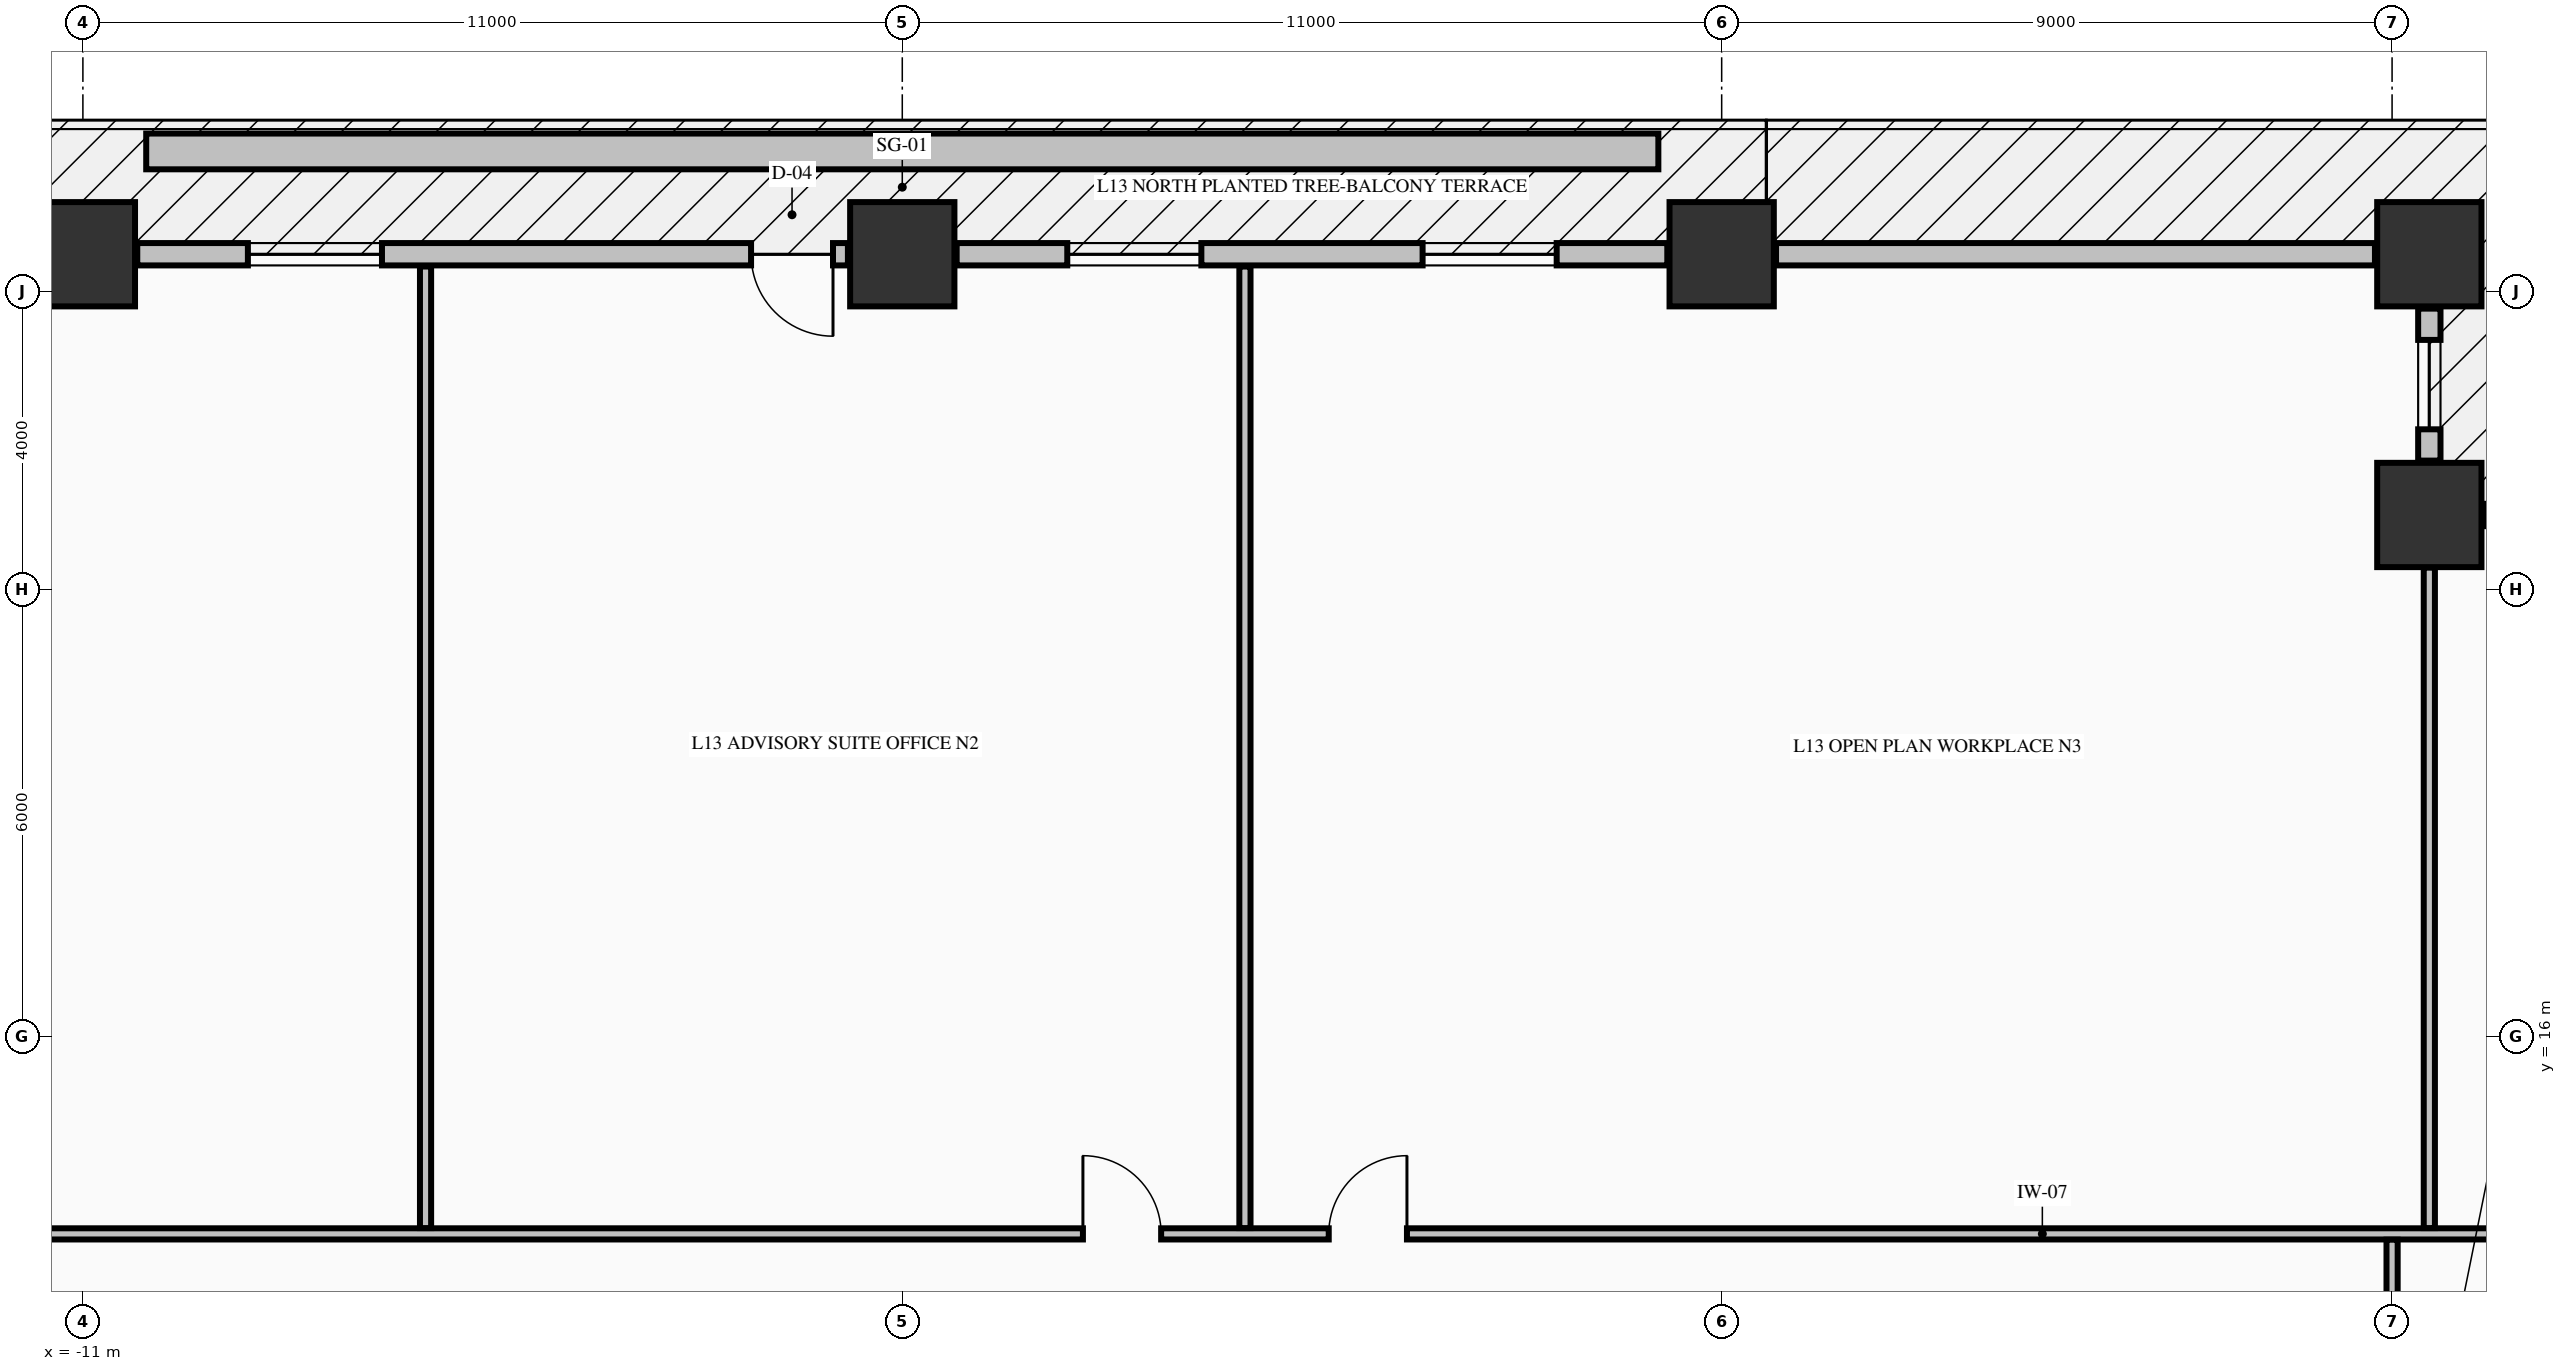
"""IFC4 building model, lengths in metres.
Left out: names, types, materials, properties, quantities, classifications, styles, units other than length and angle.
Written with IfcOpenShell. Run it as: python <this file> out.ifc"""

import sys

from ifc_helpers import new_model, si_unit, direction, frame, frame_2d, origin, origin_2d, place, context, subcontext, project, spatial, rectangle, extrude, element, fill, save


model = new_model("IFC4")
c1 = context("Model", 3, precision=1e-05, world=origin(), true_north=direction((0.0, 1.0)))
c2 = subcontext(c1, "Body", "Model", "MODEL_VIEW")
j1 = project(units=[si_unit("LENGTHUNIT", "METRE"), si_unit("PLANEANGLEUNIT", "RADIAN")], contexts=[c1])
p1 = place(None, origin())
s1 = spatial("IfcSite", under=j1, at=p1, CompositionType="ELEMENT")
p2 = place(p1, origin())
s2 = spatial("IfcBuilding", under=s1, at=p2, CompositionType="ELEMENT")
p3 = place(p2, frame((0.0, 0.0, 57.19)))
s3 = spatial("IfcBuildingStorey", under=s2, at=p3, CompositionType="ELEMENT", Elevation=57.19)
for number, where, z_axis, x_axis in (
    (1, (-11.0, 26.5, -0.425), (0.0, 0.0, 1.0), (1.0, 0.0, 0.0)),
    (2, (0.0, 26.5, -0.425), (0.0, 0.0, 1.0), (1.0, 0.0, 0.0)),
    (3, (11.0, 26.5, -0.425), (0.0, 0.0, 1.0), (1.0, 0.0, 0.0)),
    (4, (20.5, 26.5, -0.425), (0.0, 0.0, 1.0), (1.0, 0.0, 0.0)),
    (5, (20.5, 23.0, -0.425), (0.0, 0.0, 1.0), (1.0, 0.0, 0.0)),
):
    element("IfcColumn", number, at=place(p3, frame(where, z_axis=z_axis, x_axis=x_axis)), inside=s3, PredefinedType="COLUMN", context=c2, shape_type="SweptSolid", body=[
        extrude(rectangle(XDim=1.4, YDim=1.4, at=origin_2d()), origin(), (0.0, 0.0, 1.0), 3.695),
    ])
p4 = place(p3, frame((23.27, 23.0, 0.0), z_axis=(0.0, 0.0, 1.0), x_axis=(-1.0, 0.0, 0.0)))
e6 = element("IfcWall", 6, at=p4, inside=s3, PredefinedType="STANDARD", context=c2, shape_type="SweptSolid", body=[
    extrude(rectangle(XDim=2.04, YDim=0.3, at=frame_2d((1.02, 0.0))), origin(), (0.0, 0.0, 1.0), 2.662),
])
p5 = place(p4, frame((0.42, 0.0, 0.82)))
e7 = element("IfcOpeningElement", 7, at=p5, cuts=e6, PredefinedType="OPENING", context=c2, shape_type="SweptSolid", body=[
    extrude(rectangle(XDim=1.2, YDim=1.65, at=frame_2d((0.6, 0.825))), frame((0.0, 0.16, 0.0), z_axis=(0.0, -1.0, 0.0), x_axis=(1.0, 0.0, 0.0)), (0.0, 0.0, 1.0), 0.32),
])
p6 = place(p3, frame((20.5, 23.73, 0.0), z_axis=(0.0, 0.0, 1.0), x_axis=(0.0, 1.0, 0.0)))
e8 = element("IfcWall", 8, at=p6, inside=s3, PredefinedType="STANDARD", context=c2, shape_type="SweptSolid", body=[
    extrude(rectangle(XDim=2.04, YDim=0.3, at=frame_2d((1.02, 0.0))), origin(), (0.0, 0.0, 1.0), 2.662),
])
p7 = place(p6, frame((0.42, 0.0, 0.82)))
e9 = element("IfcOpeningElement", 9, at=p7, cuts=e8, PredefinedType="OPENING", context=c2, shape_type="SweptSolid", body=[
    extrude(rectangle(XDim=1.2, YDim=1.65, at=frame_2d((0.6, 0.825))), frame((0.0, 0.16, 0.0), z_axis=(0.0, -1.0, 0.0), x_axis=(1.0, 0.0, 0.0)), (0.0, 0.0, 1.0), 0.32),
])
p8 = place(p3, frame((-0.73, 26.5, 0.0), z_axis=(0.0, 0.0, 1.0), x_axis=(-1.0, 0.0, 0.0)))
e10 = element("IfcWall", 10, at=p8, inside=s3, PredefinedType="STANDARD", context=c2, shape_type="SweptSolid", body=[
    extrude(rectangle(XDim=9.54, YDim=0.3, at=frame_2d((4.77, 0.0))), origin(), (0.0, 0.0, 1.0), 2.662),
])
p9 = place(p8, frame((0.2, 0.0, 0.0)))
e11 = element("IfcOpeningElement", 11, at=p9, cuts=e10, PredefinedType="OPENING", context=c2, shape_type="SweptSolid", body=[
    extrude(rectangle(XDim=1.1, YDim=2.15, at=frame_2d((0.55, 1.075))), frame((0.0, 0.16, 0.0), z_axis=(0.0, -1.0, 0.0), x_axis=(1.0, 0.0, 0.0)), (0.0, 0.0, 1.0), 0.32),
])
p10 = place(p8, frame((6.255, 0.0, 0.78)))
e12 = element("IfcOpeningElement", 12, at=p10, cuts=e10, PredefinedType="OPENING", context=c2, shape_type="SweptSolid", body=[
    extrude(rectangle(XDim=1.8, YDim=1.72, at=frame_2d((0.9, 0.86))), frame((0.0, 0.16, 0.0), z_axis=(0.0, -1.0, 0.0), x_axis=(1.0, 0.0, 0.0)), (0.0, 0.0, 1.0), 0.32),
])
p11 = place(p3, frame((10.27, 26.5, 0.0), z_axis=(0.0, 0.0, 1.0), x_axis=(-1.0, 0.0, 0.0)))
e13 = element("IfcWall", 13, at=p11, inside=s3, PredefinedType="STANDARD", context=c2, shape_type="SweptSolid", body=[
    extrude(rectangle(XDim=9.54, YDim=0.3, at=frame_2d((4.77, 0.0))), origin(), (0.0, 0.0, 1.0), 2.662),
])
p12 = place(p11, frame((1.485, 0.0, 0.78)))
e14 = element("IfcOpeningElement", 14, at=p12, cuts=e13, PredefinedType="OPENING", context=c2, shape_type="SweptSolid", body=[
    extrude(rectangle(XDim=1.8, YDim=1.72, at=frame_2d((0.9, 0.86))), frame((0.0, 0.16, 0.0), z_axis=(0.0, -1.0, 0.0), x_axis=(1.0, 0.0, 0.0)), (0.0, 0.0, 1.0), 0.32),
])
p13 = place(p11, frame((6.255, 0.0, 0.78)))
e15 = element("IfcOpeningElement", 15, at=p13, cuts=e13, PredefinedType="OPENING", context=c2, shape_type="SweptSolid", body=[
    extrude(rectangle(XDim=1.8, YDim=1.72, at=frame_2d((0.9, 0.86))), frame((0.0, 0.16, 0.0), z_axis=(0.0, -1.0, 0.0), x_axis=(1.0, 0.0, 0.0)), (0.0, 0.0, 1.0), 0.32),
])
p14 = place(p3, frame((19.77, 26.5, 0.0), z_axis=(0.0, 0.0, 1.0), x_axis=(-1.0, 0.0, 0.0)))
e16 = element("IfcWall", 16, at=p14, inside=s3, PredefinedType="STANDARD", context=c2, shape_type="SweptSolid", body=[
    extrude(rectangle(XDim=8.04, YDim=0.3, at=frame_2d((4.02, 0.0))), origin(), (0.0, 0.0, 1.0), 2.662),
])
p15 = place(p3, frame((-28.835, 13.35, 0.0), z_axis=(0.0, 0.0, 1.0), x_axis=(1.0, 0.0, 0.0)))
e17 = element("IfcWall", 17, at=p15, inside=s3, PredefinedType="PARTITIONING", context=c2, shape_type="SweptSolid", body=[
    extrude(rectangle(XDim=52.67, YDim=0.15, at=frame_2d((26.335, 0.0))), origin(), (0.0, 0.0, 1.0), 3.27),
])
p16 = place(p15, frame((15.21, 0.0, 0.0)))
e18 = element("IfcOpeningElement", 18, at=p16, cuts=e17, PredefinedType="OPENING", context=c2, shape_type="SweptSolid", body=[
    extrude(rectangle(XDim=1.05, YDim=2.15, at=frame_2d((0.525, 1.075))), frame((0.0, 0.085, 0.0), z_axis=(0.0, -1.0, 0.0), x_axis=(1.0, 0.0, 0.0)), (0.0, 0.0, 1.0), 0.17),
])
p17 = place(p15, frame((31.26, 0.0, 0.0)))
e19 = element("IfcOpeningElement", 19, at=p17, cuts=e17, PredefinedType="OPENING", context=c2, shape_type="SweptSolid", body=[
    extrude(rectangle(XDim=1.05, YDim=2.15, at=frame_2d((0.525, 1.075))), frame((0.0, 0.085, 0.0), z_axis=(0.0, -1.0, 0.0), x_axis=(1.0, 0.0, 0.0)), (0.0, 0.0, 1.0), 0.17),
])
p18 = place(p15, frame((34.56, 0.0, 0.0)))
e20 = element("IfcOpeningElement", 20, at=p18, cuts=e17, PredefinedType="OPENING", context=c2, shape_type="SweptSolid", body=[
    extrude(rectangle(XDim=1.05, YDim=2.15, at=frame_2d((0.525, 1.075))), frame((0.0, 0.085, 0.0), z_axis=(0.0, -1.0, 0.0), x_axis=(1.0, 0.0, 0.0)), (0.0, 0.0, 1.0), 0.17),
])
for number, where, z_axis, x_axis in (
    (21, (-6.4, 13.428, 0.0), (0.0, 0.0, 1.0), (0.0, 1.0, 0.0)),
    (22, (4.6, 13.428, 0.0), (0.0, 0.0, 1.0), (0.0, 1.0, 0.0)),
):
    element("IfcWall", number, at=place(p3, frame(where, z_axis=z_axis, x_axis=x_axis)), inside=s3, PredefinedType="PARTITIONING", context=c2, shape_type="SweptSolid", body=[
        extrude(rectangle(XDim=12.907, YDim=0.15, at=frame_2d((6.454, 0.0))), origin(), (0.0, 0.0, 1.0), 3.27),
    ])
p19 = place(p3, frame((20.0, 11.106, 0.0), z_axis=(0.0, 0.0, 1.0), x_axis=(0.0, 1.0, 0.0)))
e23 = element("IfcWall", 23, at=p19, inside=s3, PredefinedType="PARTITIONING", context=c2, shape_type="SweptSolid", body=[
    extrude(rectangle(XDim=2.166, YDim=0.15, at=frame_2d((1.083, 0.0))), origin(), (0.0, 0.0, 1.0), 3.27),
])
p20 = place(p19, frame((0.349, 0.0, 0.0)))
e24 = element("IfcOpeningElement", 24, at=p20, cuts=e23, PredefinedType="OPENING", context=c2, shape_type="SweptSolid", body=[
    extrude(rectangle(XDim=0.95, YDim=2.15, at=frame_2d((0.475, 1.075))), frame((0.0, 0.085, 0.0), z_axis=(0.0, -1.0, 0.0), x_axis=(1.0, 0.0, 0.0)), (0.0, 0.0, 1.0), 0.17),
])
p21 = place(p3, frame((20.5, 13.428, 0.0), z_axis=(0.0, 0.0, 1.0), x_axis=(0.0, 1.0, 0.0)))
e25 = element("IfcWall", 25, at=p21, inside=s3, PredefinedType="PARTITIONING", context=c2, shape_type="SweptSolid", body=[
    extrude(rectangle(XDim=8.866, YDim=0.15, at=frame_2d((4.433, 0.0))), origin(), (0.0, 0.0, 1.0), 3.27),
])
p22 = place(p3, frame((-10.15, 27.88, -0.04), z_axis=(0.0, 0.0, 1.0), x_axis=(1.0, 0.0, 0.0)))
e26 = element("IfcWall", 26, at=p22, inside=s3, PredefinedType="PARAPET", context=c2, shape_type="SweptSolid", body=[
    extrude(rectangle(XDim=20.3, YDim=0.48, at=frame_2d((10.15, 0.0))), origin(), (0.0, 0.0, 1.0), 0.52),
])
p23 = place(p7, origin())
e27 = element("IfcWindow", 27, at=p23, inside=s3, PartitioningType="SINGLE_PANEL", PredefinedType="WINDOW", context=c2, shape_type="SweptSolid", body=[
    extrude(rectangle(XDim=1.2, YDim=1.65, at=frame_2d((0.6, 0.825))), frame((0.0, 0.03, 0.0), z_axis=(0.0, -1.0, 0.0), x_axis=(1.0, 0.0, 0.0)), (0.0, 0.0, 1.0), 0.06),
])
fill(e9, e27)
p24 = place(p9, origin())
e28 = element("IfcDoor", 28, at=p24, inside=s3, OperationType="SINGLE_SWING_LEFT", PredefinedType="DOOR", context=c2, shape_type="SweptSolid", body=[
    extrude(rectangle(XDim=1.1, YDim=2.15, at=frame_2d((0.55, 1.075))), frame((0.0, 0.025, 0.0), z_axis=(0.0, -1.0, 0.0), x_axis=(1.0, 0.0, 0.0)), (0.0, 0.0, 1.0), 0.05),
])
fill(e11, e28)
p25 = place(p10, origin())
e29 = element("IfcWindow", 29, at=p25, inside=s3, PartitioningType="SINGLE_PANEL", PredefinedType="WINDOW", context=c2, shape_type="SweptSolid", body=[
    extrude(rectangle(XDim=1.8, YDim=1.72, at=frame_2d((0.9, 0.86))), frame((0.0, 0.03, 0.0), z_axis=(0.0, -1.0, 0.0), x_axis=(1.0, 0.0, 0.0)), (0.0, 0.0, 1.0), 0.06),
])
fill(e12, e29)
p26 = place(p12, origin())
e30 = element("IfcWindow", 30, at=p26, inside=s3, PartitioningType="SINGLE_PANEL", PredefinedType="WINDOW", context=c2, shape_type="SweptSolid", body=[
    extrude(rectangle(XDim=1.8, YDim=1.72, at=frame_2d((0.9, 0.86))), frame((0.0, 0.03, 0.0), z_axis=(0.0, -1.0, 0.0), x_axis=(1.0, 0.0, 0.0)), (0.0, 0.0, 1.0), 0.06),
])
fill(e14, e30)
p27 = place(p13, origin())
e31 = element("IfcWindow", 31, at=p27, inside=s3, PartitioningType="SINGLE_PANEL", PredefinedType="WINDOW", context=c2, shape_type="SweptSolid", body=[
    extrude(rectangle(XDim=1.8, YDim=1.72, at=frame_2d((0.9, 0.86))), frame((0.0, 0.03, 0.0), z_axis=(0.0, -1.0, 0.0), x_axis=(1.0, 0.0, 0.0)), (0.0, 0.0, 1.0), 0.06),
])
fill(e15, e31)
p28 = place(p17, origin())
e32 = element("IfcDoor", 32, at=p28, inside=s3, OperationType="SINGLE_SWING_LEFT", PredefinedType="DOOR", context=c2, shape_type="SweptSolid", body=[
    extrude(rectangle(XDim=1.05, YDim=2.15, at=frame_2d((0.525, 1.075))), frame((0.0, 0.025, 0.0), z_axis=(0.0, -1.0, 0.0), x_axis=(1.0, 0.0, 0.0)), (0.0, 0.0, 1.0), 0.05),
])
fill(e19, e32)
p29 = place(p18, origin())
e33 = element("IfcDoor", 33, at=p29, inside=s3, OperationType="SINGLE_SWING_RIGHT", PredefinedType="DOOR", context=c2, shape_type="SweptSolid", body=[
    extrude(rectangle(XDim=1.05, YDim=2.15, at=frame_2d((0.525, 1.075))), frame((0.0, 0.025, 0.0), z_axis=(0.0, -1.0, 0.0), x_axis=(1.0, 0.0, 0.0)), (0.0, 0.0, 1.0), 0.05),
])
fill(e20, e33)
save(model, sys.argv[1])
